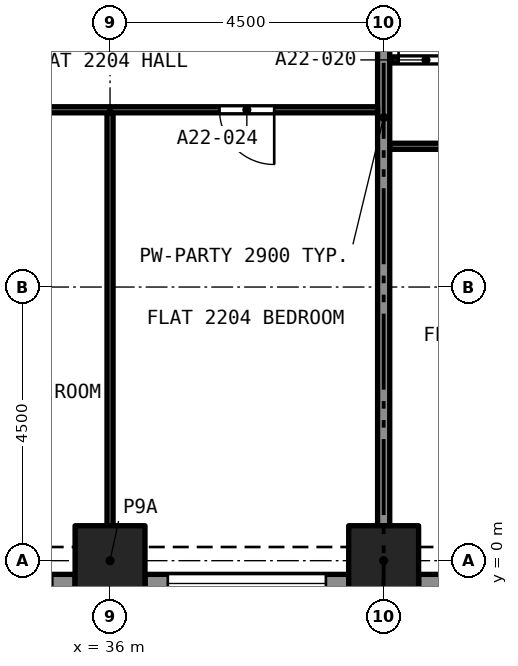
"""IFC4 building model, lengths in metres.
Left out: names, types, materials, properties, quantities, classifications, styles, units other than length and angle.
Written with IfcOpenShell. Run it as: python <this file> out.ifc"""

import sys

from ifc_helpers import new_model, si_unit, direction, frame, frame_2d, origin, origin_2d, place, context, subcontext, project, spatial, rectangle, extrude, element, fill, save


model = new_model("IFC4")
c1 = context("Model", 3, precision=1e-05, world=origin(), true_north=direction((0.0, 1.0)))
c2 = subcontext(c1, "Body", "Model", "MODEL_VIEW")
j1 = project(units=[si_unit("LENGTHUNIT", "METRE"), si_unit("PLANEANGLEUNIT", "RADIAN")], contexts=[c1])
p1 = place(None, origin())
s1 = spatial("IfcSite", under=j1, at=p1, CompositionType="ELEMENT")
p2 = place(p1, origin())
s2 = spatial("IfcBuilding", under=s1, at=p2, CompositionType="ELEMENT")
p3 = place(p2, frame((0.0, 0.0, 83.2)))
s3 = spatial("IfcBuildingStorey", under=s2, at=p3, CompositionType="ELEMENT", Elevation=83.2)
for number, where, z_axis, x_axis in (
    (1, (36.0, 0.0, 0.0), (0.0, 0.0, 1.0), (1.0, 0.0, 0.0)),
    (2, (40.5, 0.0, 0.0), (0.0, 0.0, 1.0), (1.0, 0.0, 0.0)),
):
    element("IfcColumn", number, at=place(p3, frame(where, z_axis=z_axis, x_axis=x_axis)), inside=s3, PredefinedType="COLUMN", context=c2, shape_type="SweptSolid", body=[
        extrude(rectangle(XDim=1.15, YDim=1.15, at=origin_2d()), origin(), (0.0, 0.0, 1.0), 3.2),
    ])
p4 = place(p3, frame((35.425, -0.375, 0.0), z_axis=(0.0, 0.0, 1.0), x_axis=(-1.0, 0.0, 0.0)))
e3 = element("IfcWall", 3, at=p4, inside=s3, PredefinedType="SOLIDWALL", context=c2, shape_type="SweptSolid", body=[
    extrude(rectangle(XDim=3.35, YDim=0.3, at=frame_2d((1.675, 0.0))), origin(), (0.0, 0.0, 1.0), 3.2),
])
p5 = place(p4, frame((0.375, 0.0, 0.45)))
e4 = element("IfcOpeningElement", 4, at=p5, cuts=e3, PredefinedType="OPENING", context=c2, shape_type="SweptSolid", body=[
    extrude(rectangle(XDim=2.6, YDim=1.95, at=frame_2d((1.3, 0.975))), frame((0.0, 0.16, 0.0), z_axis=(0.0, -1.0, 0.0), x_axis=(1.0, 0.0, 0.0)), (0.0, 0.0, 1.0), 0.32),
])
p6 = place(p3, frame((39.925, -0.375, 0.0), z_axis=(0.0, 0.0, 1.0), x_axis=(-1.0, 0.0, 0.0)))
e5 = element("IfcWall", 5, at=p6, inside=s3, PredefinedType="SOLIDWALL", context=c2, shape_type="SweptSolid", body=[
    extrude(rectangle(XDim=3.35, YDim=0.3, at=frame_2d((1.675, 0.0))), origin(), (0.0, 0.0, 1.0), 3.2),
])
p7 = place(p6, frame((0.375, 0.0, 0.45)))
e6 = element("IfcOpeningElement", 6, at=p7, cuts=e5, PredefinedType="OPENING", context=c2, shape_type="SweptSolid", body=[
    extrude(rectangle(XDim=2.6, YDim=1.95, at=frame_2d((1.3, 0.975))), frame((0.0, 0.16, 0.0), z_axis=(0.0, -1.0, 0.0), x_axis=(1.0, 0.0, 0.0)), (0.0, 0.0, 1.0), 0.32),
])
p8 = place(p3, frame((44.425, -0.375, 0.0), z_axis=(0.0, 0.0, 1.0), x_axis=(-1.0, 0.0, 0.0)))
e7 = element("IfcWall", 7, at=p8, inside=s3, PredefinedType="SOLIDWALL", context=c2, shape_type="SweptSolid", body=[
    extrude(rectangle(XDim=3.35, YDim=0.3, at=frame_2d((1.675, 0.0))), origin(), (0.0, 0.0, 1.0), 3.2),
])
p9 = place(p8, frame((0.375, 0.0, 0.45)))
e8 = element("IfcOpeningElement", 8, at=p9, cuts=e7, PredefinedType="OPENING", context=c2, shape_type="SweptSolid", body=[
    extrude(rectangle(XDim=2.6, YDim=1.95, at=frame_2d((1.3, 0.975))), frame((0.0, 0.16, 0.0), z_axis=(0.0, -1.0, 0.0), x_axis=(1.0, 0.0, 0.0)), (0.0, 0.0, 1.0), 0.32),
])
p10 = place(p3, frame((44.95, 6.815, 0.0), z_axis=(0.0, 0.0, 1.0), x_axis=(-1.0, 0.0, 0.0)))
e9 = element("IfcWall", 9, at=p10, inside=s3, PredefinedType="PARTITIONING", context=c2, shape_type="SweptSolid", body=[
    extrude(rectangle(XDim=4.35, YDim=0.1, at=frame_2d((2.175, 0.0))), origin(), (0.0, 0.0, 1.0), 2.9),
])
p11 = place(p10, frame((1.75, 0.0, 0.0)))
e10 = element("IfcOpeningElement", 10, at=p11, cuts=e9, PredefinedType="OPENING", context=c2, shape_type="SweptSolid", body=[
    extrude(rectangle(XDim=0.9, YDim=2.1, at=frame_2d((0.45, 1.05))), frame((0.0, 0.06, 0.0), z_axis=(0.0, -1.0, 0.0), x_axis=(1.0, 0.0, 0.0)), (0.0, 0.0, 1.0), 0.12),
])
p12 = place(p3, frame((40.5, 0.575, 0.0), z_axis=(0.0, 0.0, 1.0), x_axis=(0.0, 1.0, 0.0)))
e11 = element("IfcWall", 11, at=p12, inside=s3, PredefinedType="PARTITIONING", context=c2, shape_type="SweptSolid", body=[
    extrude(rectangle(XDim=13.425, YDim=0.2, at=frame_2d((6.712, 0.0))), origin(), (0.0, 0.0, 1.0), 2.9),
])
p13 = place(p3, frame((40.6, 8.235, 0.0), z_axis=(0.0, 0.0, 1.0), x_axis=(1.0, 0.0, 0.0)))
e12 = element("IfcWall", 12, at=p13, inside=s3, PredefinedType="PARTITIONING", context=c2, shape_type="SweptSolid", body=[
    extrude(rectangle(XDim=1.291, YDim=0.1, at=frame_2d((0.646, 0.0))), origin(), (0.0, 0.0, 1.0), 2.9),
])
p14 = place(p13, frame((0.146, 0.0, 0.0)))
e13 = element("IfcOpeningElement", 13, at=p14, cuts=e12, PredefinedType="OPENING", context=c2, shape_type="SweptSolid", body=[
    extrude(rectangle(XDim=0.9, YDim=2.1, at=frame_2d((0.45, 1.05))), frame((0.0, 0.06, 0.0), z_axis=(0.0, -1.0, 0.0), x_axis=(1.0, 0.0, 0.0)), (0.0, 0.0, 1.0), 0.12),
])
p15 = place(p3, frame((40.4, 7.415, 0.0), z_axis=(0.0, 0.0, 1.0), x_axis=(-1.0, 0.0, 0.0)))
e14 = element("IfcWall", 14, at=p15, inside=s3, PredefinedType="PARTITIONING", context=c2, shape_type="SweptSolid", body=[
    extrude(rectangle(XDim=4.4, YDim=0.1, at=frame_2d((2.2, 0.0))), origin(), (0.0, 0.0, 1.0), 2.9),
])
p16 = place(p15, frame((1.7, 0.0, 0.0)))
e15 = element("IfcOpeningElement", 15, at=p16, cuts=e14, PredefinedType="OPENING", context=c2, shape_type="SweptSolid", body=[
    extrude(rectangle(XDim=0.9, YDim=2.1, at=frame_2d((0.45, 1.05))), frame((0.0, 0.06, 0.0), z_axis=(0.0, -1.0, 0.0), x_axis=(1.0, 0.0, 0.0)), (0.0, 0.0, 1.0), 0.12),
])
p17 = place(p3, frame((36.0, 0.575, 0.0), z_axis=(0.0, 0.0, 1.0), x_axis=(0.0, 1.0, 0.0)))
e16 = element("IfcWall", 16, at=p17, inside=s3, PredefinedType="PARTITIONING", context=c2, shape_type="SweptSolid", body=[
    extrude(rectangle(XDim=6.79, YDim=0.1, at=frame_2d((3.395, 0.0))), origin(), (0.0, 0.0, 1.0), 2.9),
])
p18 = place(p3, frame((36.0, 7.415, 0.0), z_axis=(0.0, 0.0, 1.0), x_axis=(-1.0, 0.0, 0.0)))
e17 = element("IfcWall", 17, at=p18, inside=s3, PredefinedType="PARTITIONING", context=c2, shape_type="SweptSolid", body=[
    extrude(rectangle(XDim=4.375, YDim=0.1, at=frame_2d((2.188, 0.0))), origin(), (0.0, 0.0, 1.0), 2.9),
])
p19 = place(p18, frame((1.75, 0.0, 0.0)))
e18 = element("IfcOpeningElement", 18, at=p19, cuts=e17, PredefinedType="OPENING", context=c2, shape_type="SweptSolid", body=[
    extrude(rectangle(XDim=1.0, YDim=2.1, at=frame_2d((0.5, 1.05))), frame((0.0, 0.06, 0.0), z_axis=(0.0, -1.0, 0.0), x_axis=(1.0, 0.0, 0.0)), (0.0, 0.0, 1.0), 0.12),
])
p20 = place(p7, origin())
e19 = element("IfcWindow", 19, at=p20, inside=s3, PartitioningType="SINGLE_PANEL", PredefinedType="WINDOW", context=c2, shape_type="SweptSolid", body=[
    extrude(rectangle(XDim=2.6, YDim=1.95, at=frame_2d((1.3, 0.975))), frame((0.0, 0.03, 0.0), z_axis=(0.0, -1.0, 0.0), x_axis=(1.0, 0.0, 0.0)), (0.0, 0.0, 1.0), 0.06),
])
fill(e6, e19)
p21 = place(p14, origin())
e20 = element("IfcDoor", 20, at=p21, inside=s3, OperationType="SINGLE_SWING_LEFT", PredefinedType="DOOR", context=c2, shape_type="SweptSolid", body=[
    extrude(rectangle(XDim=0.9, YDim=2.1, at=frame_2d((0.45, 1.05))), frame((0.0, 0.025, 0.0), z_axis=(0.0, -1.0, 0.0), x_axis=(1.0, 0.0, 0.0)), (0.0, 0.0, 1.0), 0.05),
])
fill(e13, e20)
p22 = place(p16, origin())
e21 = element("IfcDoor", 21, at=p22, inside=s3, OperationType="SINGLE_SWING_LEFT", PredefinedType="DOOR", context=c2, shape_type="SweptSolid", body=[
    extrude(rectangle(XDim=0.9, YDim=2.1, at=frame_2d((0.45, 1.05))), frame((0.0, 0.025, 0.0), z_axis=(0.0, -1.0, 0.0), x_axis=(1.0, 0.0, 0.0)), (0.0, 0.0, 1.0), 0.05),
])
fill(e15, e21)
save(model, sys.argv[1])
